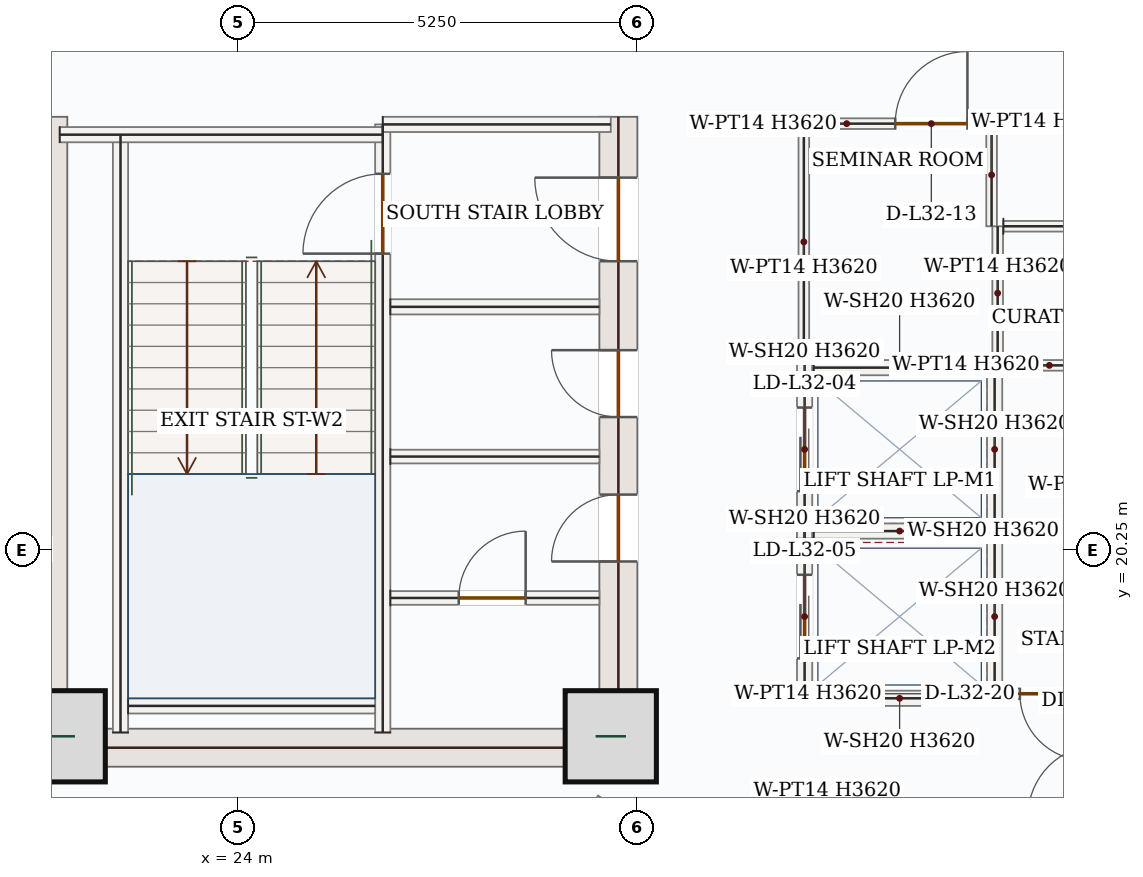
"""IFC4 building model, lengths in metres.
Left out: names, types, materials, properties, quantities, classifications, styles, units other than length and angle.
Written with IfcOpenShell. Run it as: python <this file> out.ifc"""

import sys

from ifc_helpers import new_model, si_unit, direction, frame, frame_2d, origin, origin_2d, place, context, subcontext, project, spatial, rectangle, extrude, source, transform, mapped, element, fill, save


model = new_model("IFC4")
c1 = context("Model", 3, precision=1e-05, world=origin(), true_north=direction((0.0, 1.0)))
c2 = subcontext(c1, "Body", "Model", "MODEL_VIEW")
j1 = project(units=[si_unit("LENGTHUNIT", "METRE"), si_unit("PLANEANGLEUNIT", "RADIAN")], contexts=[c1])
p1 = place(None, origin())
s1 = spatial("IfcSite", under=j1, at=p1, CompositionType="ELEMENT")
p2 = place(p1, origin())
s2 = spatial("IfcBuilding", under=s1, at=p2, CompositionType="ELEMENT")
p3 = place(p2, frame((0.0, 0.0, 143.4)))
s3 = spatial("IfcBuildingStorey", under=s2, at=p3, CompositionType="ELEMENT", Elevation=143.4)
m1 = source(origin(), c2, "Body", "SweptSolid", [
    extrude(rectangle(XDim=8.55, YDim=0.5, at=frame_2d((4.275, 0.0))), origin(), (0.0, 0.0, 1.0), 3.62),
])
p4 = place(p3, frame((21.5, 17.4, 0.0), z_axis=(0.0, 0.0, 1.0), x_axis=(0.0, 1.0, 0.0)))
e1 = element("IfcWall", 1, at=p4, inside=s3, PredefinedType="SHEAR", context=c2, shape_type="MappedRepresentation", body=[
    mapped(m1, transform((0.0, 0.0, 0.0), x_axis=(1.0, 0.0, 0.0), y_axis=(0.0, 1.0, 0.0), z_axis=(0.0, 0.0, 1.0), scale=1.0)),
])
p5 = place(p3, frame((29.0, 17.4, 0.0), z_axis=(0.0, 0.0, 1.0), x_axis=(0.0, 1.0, 0.0)))
e2 = element("IfcWall", 2, at=p5, inside=s3, PredefinedType="SHEAR", context=c2, shape_type="SweptSolid", body=[
    extrude(rectangle(XDim=8.55, YDim=0.5, at=frame_2d((4.275, 0.0))), origin(), (0.0, 0.0, 1.0), 3.62),
])
p6 = place(p5, frame((6.65, 0.0, 0.0)))
e3 = element("IfcOpeningElement", 3, at=p6, cuts=e2, PredefinedType="OPENING", context=c2, shape_type="SweptSolid", body=[
    extrude(rectangle(XDim=1.1, YDim=2.2, at=frame_2d((0.55, 1.1))), frame((0.0, 0.26, 0.0), z_axis=(0.0, -1.0, 0.0), x_axis=(1.0, 0.0, 0.0)), (0.0, 0.0, 1.0), 0.52),
])
p7 = place(p5, frame((2.7, 0.0, 0.0)))
e4 = element("IfcOpeningElement", 4, at=p7, cuts=e2, PredefinedType="OPENING", context=c2, shape_type="SweptSolid", body=[
    extrude(rectangle(XDim=0.88, YDim=2.1, at=frame_2d((0.44, 1.05))), frame((0.0, 0.26, 0.0), z_axis=(0.0, -1.0, 0.0), x_axis=(1.0, 0.0, 0.0)), (0.0, 0.0, 1.0), 0.52),
])
p8 = place(p5, frame((4.6, 0.0, 0.0)))
e5 = element("IfcOpeningElement", 5, at=p8, cuts=e2, PredefinedType="OPENING", context=c2, shape_type="SweptSolid", body=[
    extrude(rectangle(XDim=0.88, YDim=2.1, at=frame_2d((0.44, 1.05))), frame((0.0, 0.26, 0.0), z_axis=(0.0, -1.0, 0.0), x_axis=(1.0, 0.0, 0.0)), (0.0, 0.0, 1.0), 0.52),
])
m2 = source(origin(), c2, "Body", "SweptSolid", [
    extrude(rectangle(XDim=7.0, YDim=0.5, at=frame_2d((3.5, 0.0))), origin(), (0.0, 0.0, 1.0), 3.62),
])
p9 = place(p3, frame((21.75, 17.65, 0.0), z_axis=(0.0, 0.0, 1.0), x_axis=(1.0, 0.0, 0.0)))
e6 = element("IfcWall", 6, at=p9, inside=s3, PredefinedType="SHEAR", context=c2, shape_type="MappedRepresentation", body=[
    mapped(m2, transform((0.0, 0.0, 0.0), x_axis=(1.0, 0.0, 0.0), y_axis=(0.0, 1.0, 0.0), z_axis=(0.0, 0.0, 1.0), scale=1.0)),
])
m3 = source(origin(), c2, "Body", "SweptSolid", [
    extrude(rectangle(XDim=1.2, YDim=1.2, at=origin_2d()), origin(), (0.0, 0.0, 1.0), 3.9),
])
for number, where, z_axis, x_axis in (
    (7, (21.65, 17.8, 0.0), (0.0, 0.0, 1.0), (1.0, 0.0, 0.0)),
    (8, (28.9, 17.8, 0.0), (0.0, 0.0, 1.0), (1.0, 0.0, 0.0)),
):
    element("IfcColumn", number, at=place(p3, frame(where, z_axis=z_axis, x_axis=x_axis)), inside=s3, PredefinedType="COLUMN", context=c2, shape_type="MappedRepresentation", body=[
        mapped(m3, transform((0.0, 0.0, 0.0), x_axis=(1.0, 0.0, 0.0), y_axis=(0.0, 1.0, 0.0), z_axis=(0.0, 0.0, 1.0), scale=1.0)),
    ])
p10 = place(p3, frame((22.658, 14.74, 0.0), z_axis=(0.0, 0.0, 1.0), x_axis=(-0.707076011326, 0.707137549708, 0.0)))
e9 = element("IfcWall", 9, at=p10, inside=s3, PredefinedType="SOLIDWALL", context=c2, shape_type="SweptSolid", body=[
    extrude(rectangle(XDim=3.967, YDim=0.28, at=frame_2d((1.984, 0.0))), origin(), (0.0, 0.0, 1.0), 3.62),
])
p11 = place(p10, frame((1.084, 0.0, 0.85)))
e10 = element("IfcOpeningElement", 10, at=p11, cuts=e9, PredefinedType="OPENING", context=c2, shape_type="SweptSolid", body=[
    extrude(rectangle(XDim=1.8, YDim=1.75, at=frame_2d((0.9, 0.875))), frame((0.0, 0.15, 0.0), z_axis=(0.0, -1.0, 0.0), x_axis=(1.0, 0.0, 0.0)), (0.0, 0.0, 1.0), 0.3),
])
m4 = source(origin(), c2, "Body", "SweptSolid", [
    extrude(rectangle(XDim=7.87, YDim=0.2, at=frame_2d((3.935, 0.0))), origin(), (0.0, 0.0, 1.0), 3.62),
])
p12 = place(p3, frame((22.45, 17.85, 0.0), z_axis=(0.0, 0.0, 1.0), x_axis=(0.0, 1.0, 0.0)))
e11 = element("IfcWall", 11, at=p12, inside=s3, PredefinedType="SOLIDWALL", context=c2, shape_type="MappedRepresentation", body=[
    mapped(m4, transform((0.0, 0.0, 0.0), x_axis=(1.0, 0.0, 0.0), y_axis=(0.0, 1.0, 0.0), z_axis=(0.0, 0.0, 1.0), scale=1.0)),
])
p13 = place(p3, frame((25.9, 17.85, 0.0), z_axis=(0.0, 0.0, 1.0), x_axis=(0.0, 1.0, 0.0)))
e12 = element("IfcWall", 12, at=p13, inside=s3, PredefinedType="SOLIDWALL", context=c2, shape_type="SweptSolid", body=[
    extrude(rectangle(XDim=8.0, YDim=0.2, at=frame_2d((4.0, 0.0))), origin(), (0.0, 0.0, 1.0), 3.62),
])
p14 = place(p13, frame((6.3, 0.0, 0.0)))
e13 = element("IfcOpeningElement", 13, at=p14, cuts=e12, PredefinedType="OPENING", context=c2, shape_type="SweptSolid", body=[
    extrude(rectangle(XDim=1.05, YDim=2.15, at=frame_2d((0.525, 1.075))), frame((0.0, 0.11, 0.0), z_axis=(0.0, -1.0, 0.0), x_axis=(1.0, 0.0, 0.0)), (0.0, 0.0, 1.0), 0.22),
])
m5 = source(origin(), c2, "Body", "SweptSolid", [
    extrude(rectangle(XDim=4.25, YDim=0.2, at=frame_2d((2.125, 0.0))), origin(), (0.0, 0.0, 1.0), 3.62),
])
p15 = place(p3, frame((21.65, 25.715, 0.0), z_axis=(0.0, 0.0, 1.0), x_axis=(1.0, 0.0, 0.0)))
e14 = element("IfcWall", 14, at=p15, inside=s3, PredefinedType="SOLIDWALL", context=c2, shape_type="MappedRepresentation", body=[
    mapped(m5, transform((0.0, 0.0, 0.0), x_axis=(1.0, 0.0, 0.0), y_axis=(0.0, 1.0, 0.0), z_axis=(0.0, 0.0, 1.0), scale=1.0)),
])
m6 = source(origin(), c2, "Body", "SweptSolid", [
    extrude(rectangle(XDim=3.0, YDim=0.2, at=frame_2d((1.5, 0.0))), origin(), (0.0, 0.0, 1.0), 3.62),
])
p16 = place(p3, frame((25.9, 25.85, 0.0), z_axis=(0.0, 0.0, 1.0), x_axis=(1.0, 0.0, 0.0)))
e15 = element("IfcWall", 15, at=p16, inside=s3, PredefinedType="SOLIDWALL", context=c2, shape_type="MappedRepresentation", body=[
    mapped(m6, transform((0.0, 0.0, 0.0), x_axis=(1.0, 0.0, 0.0), y_axis=(0.0, 1.0, 0.0), z_axis=(0.0, 0.0, 1.0), scale=1.0)),
])
m7 = source(origin(), c2, "Body", "SweptSolid", [
    extrude(rectangle(XDim=3.25, YDim=0.2, at=frame_2d((1.625, 0.0))), origin(), (0.0, 0.0, 1.0), 3.62),
])
p17 = place(p3, frame((22.55, 18.2, 0.0), z_axis=(0.0, 0.0, 1.0), x_axis=(1.0, 0.0, 0.0)))
e16 = element("IfcWall", 16, at=p17, inside=s3, PredefinedType="SOLIDWALL", context=c2, shape_type="MappedRepresentation", body=[
    mapped(m7, transform((0.0, 0.0, 0.0), x_axis=(1.0, 0.0, 0.0), y_axis=(0.0, 1.0, 0.0), z_axis=(0.0, 0.0, 1.0), scale=1.0)),
])
m8 = source(origin(), c2, "Body", "SweptSolid", [
    extrude(rectangle(XDim=2.75, YDim=0.2, at=frame_2d((1.375, 0.0))), origin(), (0.0, 0.0, 1.0), 3.62),
])
p18 = place(p3, frame((26.0, 23.45, 0.0), z_axis=(0.0, 0.0, 1.0), x_axis=(1.0, 0.0, 0.0)))
e17 = element("IfcWall", 17, at=p18, inside=s3, PredefinedType="SOLIDWALL", context=c2, shape_type="MappedRepresentation", body=[
    mapped(m8, transform((0.0, 0.0, 0.0), x_axis=(1.0, 0.0, 0.0), y_axis=(0.0, 1.0, 0.0), z_axis=(0.0, 0.0, 1.0), scale=1.0)),
])
p19 = place(p3, frame((26.0, 19.62, 0.0), z_axis=(0.0, 0.0, 1.0), x_axis=(1.0, 0.0, 0.0)))
e18 = element("IfcWall", 18, at=p19, inside=s3, PredefinedType="PARTITIONING", context=c2, shape_type="SweptSolid", body=[
    extrude(rectangle(XDim=2.75, YDim=0.18, at=frame_2d((1.375, 0.0))), origin(), (0.0, 0.0, 1.0), 3.62),
])
p20 = place(p19, frame((0.9, 0.0, 0.0)))
e19 = element("IfcOpeningElement", 19, at=p20, cuts=e18, PredefinedType="OPENING", context=c2, shape_type="SweptSolid", body=[
    extrude(rectangle(XDim=0.88, YDim=2.1, at=frame_2d((0.44, 1.05))), frame((0.0, 0.1, 0.0), z_axis=(0.0, -1.0, 0.0), x_axis=(1.0, 0.0, 0.0)), (0.0, 0.0, 1.0), 0.2),
])
m9 = source(origin(), c2, "Body", "SweptSolid", [
    extrude(rectangle(XDim=2.75, YDim=0.18, at=frame_2d((1.375, 0.0))), origin(), (0.0, 0.0, 1.0), 3.62),
])
p21 = place(p3, frame((26.0, 21.48, 0.0), z_axis=(0.0, 0.0, 1.0), x_axis=(1.0, 0.0, 0.0)))
e20 = element("IfcWall", 20, at=p21, inside=s3, PredefinedType="PARTITIONING", context=c2, shape_type="MappedRepresentation", body=[
    mapped(m9, transform((0.0, 0.0, 0.0), x_axis=(1.0, 0.0, 0.0), y_axis=(0.0, 1.0, 0.0), z_axis=(0.0, 0.0, 1.0), scale=1.0)),
])
p22 = place(p3, frame((31.45, 20.4, 0.0), z_axis=(0.0, 0.0, 1.0), x_axis=(0.0, 1.0, 0.0)))
e21 = element("IfcWall", 21, at=p22, inside=s3, PredefinedType="SOLIDWALL", context=c2, shape_type="SweptSolid", body=[
    extrude(rectangle(XDim=2.35, YDim=0.2, at=frame_2d((1.175, 0.0))), origin(), (0.0, 0.0, 1.0), 3.62),
])
p23 = place(p22, frame((0.625, 0.0, 0.0)))
e22 = element("IfcOpeningElement", 22, at=p23, cuts=e21, PredefinedType="OPENING", context=c2, shape_type="SweptSolid", body=[
    extrude(rectangle(XDim=1.1, YDim=2.15, at=frame_2d((0.55, 1.075))), frame((0.0, 0.11, 0.0), z_axis=(0.0, -1.0, 0.0), x_axis=(1.0, 0.0, 0.0)), (0.0, 0.0, 1.0), 0.22),
])
m10 = source(origin(), c2, "Body", "SweptSolid", [
    extrude(rectangle(XDim=2.35, YDim=0.2, at=frame_2d((1.175, 0.0))), origin(), (0.0, 0.0, 1.0), 3.62),
])
p24 = place(p3, frame((33.95, 20.4, 0.0), z_axis=(0.0, 0.0, 1.0), x_axis=(0.0, 1.0, 0.0)))
e23 = element("IfcWall", 23, at=p24, inside=s3, PredefinedType="SOLIDWALL", context=c2, shape_type="MappedRepresentation", body=[
    mapped(m10, transform((0.0, 0.0, 0.0), x_axis=(1.0, 0.0, 0.0), y_axis=(0.0, 1.0, 0.0), z_axis=(0.0, 0.0, 1.0), scale=1.0)),
])
m11 = source(origin(), c2, "Body", "SweptSolid", [
    extrude(rectangle(XDim=2.26, YDim=0.2, at=frame_2d((1.13, 0.0))), origin(), (0.0, 0.0, 1.0), 3.62),
])
for number, where, z_axis, x_axis in (
    (24, (31.57, 20.5, 0.0), (0.0, 0.0, 1.0), (1.0, 0.0, 0.0)),
    (25, (31.57, 22.65, 0.0), (0.0, 0.0, 1.0), (1.0, 0.0, 0.0)),
):
    element("IfcWall", number, at=place(p3, frame(where, z_axis=z_axis, x_axis=x_axis)), inside=s3, PredefinedType="SOLIDWALL", context=c2, shape_type="MappedRepresentation", body=[
        mapped(m11, transform((0.0, 0.0, 0.0), x_axis=(1.0, 0.0, 0.0), y_axis=(0.0, 1.0, 0.0), z_axis=(0.0, 0.0, 1.0), scale=1.0)),
    ])
p25 = place(p3, frame((31.45, 18.2, 0.0), z_axis=(0.0, 0.0, 1.0), x_axis=(0.0, 1.0, 0.0)))
e26 = element("IfcWall", 26, at=p25, inside=s3, PredefinedType="SOLIDWALL", context=c2, shape_type="SweptSolid", body=[
    extrude(rectangle(XDim=2.35, YDim=0.2, at=frame_2d((1.175, 0.0))), origin(), (0.0, 0.0, 1.0), 3.62),
])
p26 = place(p25, frame((0.625, 0.0, 0.0)))
e27 = element("IfcOpeningElement", 27, at=p26, cuts=e26, PredefinedType="OPENING", context=c2, shape_type="SweptSolid", body=[
    extrude(rectangle(XDim=1.1, YDim=2.15, at=frame_2d((0.55, 1.075))), frame((0.0, 0.11, 0.0), z_axis=(0.0, -1.0, 0.0), x_axis=(1.0, 0.0, 0.0)), (0.0, 0.0, 1.0), 0.22),
])
p27 = place(p3, frame((33.95, 18.2, 0.0), z_axis=(0.0, 0.0, 1.0), x_axis=(0.0, 1.0, 0.0)))
e28 = element("IfcWall", 28, at=p27, inside=s3, PredefinedType="SOLIDWALL", context=c2, shape_type="MappedRepresentation", body=[
    mapped(m10, transform((0.0, 0.0, 0.0), x_axis=(1.0, 0.0, 0.0), y_axis=(0.0, 1.0, 0.0), z_axis=(0.0, 0.0, 1.0), scale=1.0)),
])
p28 = place(p3, frame((31.57, 18.3, 0.0), z_axis=(0.0, 0.0, 1.0), x_axis=(1.0, 0.0, 0.0)))
e29 = element("IfcWall", 29, at=p28, inside=s3, PredefinedType="SOLIDWALL", context=c2, shape_type="MappedRepresentation", body=[
    mapped(m11, transform((0.0, 0.0, 0.0), x_axis=(1.0, 0.0, 0.0), y_axis=(0.0, 1.0, 0.0), z_axis=(0.0, 0.0, 1.0), scale=1.0)),
])
m12 = source(origin(), c2, "Body", "SweptSolid", [
    extrude(rectangle(XDim=1.23, YDim=0.14, at=frame_2d((0.615, 0.0))), origin(), (0.0, 0.0, 1.0), 3.62),
])
p29 = place(p3, frame((34.055, 22.68, 0.0), z_axis=(0.0, 0.0, 1.0), x_axis=(1.0, 0.0, 0.0)))
e30 = element("IfcWall", 30, at=p29, inside=s3, PredefinedType="PARTITIONING", context=c2, shape_type="MappedRepresentation", body=[
    mapped(m12, transform((0.0, 0.0, 0.0), x_axis=(1.0, 0.0, 0.0), y_axis=(0.0, 1.0, 0.0), z_axis=(0.0, 0.0, 1.0), scale=1.0)),
])
p30 = place(p3, frame((35.285, 18.36, 0.0), z_axis=(0.0, 0.0, 1.0), x_axis=(-1.0, 0.0, 0.0)))
e31 = element("IfcWall", 31, at=p30, inside=s3, PredefinedType="PARTITIONING", context=c2, shape_type="SweptSolid", body=[
    extrude(rectangle(XDim=1.23, YDim=0.14, at=frame_2d((0.615, 0.0))), origin(), (0.0, 0.0, 1.0), 3.62),
])
p31 = place(p30, frame((0.123, 0.0, 0.0)))
e32 = element("IfcOpeningElement", 32, at=p31, cuts=e31, PredefinedType="OPENING", context=c2, shape_type="SweptSolid", body=[
    extrude(rectangle(XDim=0.88, YDim=2.1, at=frame_2d((0.44, 1.05))), frame((0.0, 0.08, 0.0), z_axis=(0.0, -1.0, 0.0), x_axis=(1.0, 0.0, 0.0)), (0.0, 0.0, 1.0), 0.16),
])
m13 = source(origin(), c2, "Body", "SweptSolid", [
    extrude(rectangle(XDim=1.76, YDim=0.14, at=frame_2d((0.88, 0.0))), origin(), (0.0, 0.0, 1.0), 3.62),
])
p32 = place(p3, frame((33.99, 22.75, 0.0), z_axis=(0.0, 0.0, 1.0), x_axis=(0.0, 1.0, 0.0)))
e33 = element("IfcWall", 33, at=p32, inside=s3, PredefinedType="PARTITIONING", context=c2, shape_type="MappedRepresentation", body=[
    mapped(m13, transform((0.0, 0.0, 0.0), x_axis=(1.0, 0.0, 0.0), y_axis=(0.0, 1.0, 0.0), z_axis=(0.0, 0.0, 1.0), scale=1.0)),
])
m14 = source(origin(), c2, "Body", "SweptSolid", [
    extrude(rectangle(XDim=3.945, YDim=0.14, at=frame_2d((1.973, 0.0))), origin(), (0.0, 0.0, 1.0), 3.62),
])
p33 = place(p3, frame((34.065, 24.51, 0.0), z_axis=(0.0, 0.0, 1.0), x_axis=(1.0, 0.0, 0.0)))
e34 = element("IfcWall", 34, at=p33, inside=s3, PredefinedType="PARTITIONING", context=c2, shape_type="MappedRepresentation", body=[
    mapped(m14, transform((0.0, 0.0, 0.0), x_axis=(1.0, 0.0, 0.0), y_axis=(0.0, 1.0, 0.0), z_axis=(0.0, 0.0, 1.0), scale=1.0)),
])
m15 = source(origin(), c2, "Body", "SweptSolid", [
    extrude(rectangle(XDim=3.11, YDim=0.14, at=frame_2d((1.555, 0.0))), origin(), (0.0, 0.0, 1.0), 3.62),
])
p34 = place(p3, frame((31.44, 22.75, 0.0), z_axis=(0.0, 0.0, 1.0), x_axis=(0.0, 1.0, 0.0)))
e35 = element("IfcWall", 35, at=p34, inside=s3, PredefinedType="PARTITIONING", context=c2, shape_type="MappedRepresentation", body=[
    mapped(m15, transform((0.0, 0.0, 0.0), x_axis=(1.0, 0.0, 0.0), y_axis=(0.0, 1.0, 0.0), z_axis=(0.0, 0.0, 1.0), scale=1.0)),
])
p35 = place(p3, frame((31.515, 25.86, 0.0), z_axis=(0.0, 0.0, 1.0), x_axis=(1.0, 0.0, 0.0)))
e36 = element("IfcWall", 36, at=p35, inside=s3, PredefinedType="PARTITIONING", context=c2, shape_type="SweptSolid", body=[
    extrude(rectangle(XDim=2.395, YDim=0.14, at=frame_2d((1.198, 0.0))), origin(), (0.0, 0.0, 1.0), 3.62),
])
p36 = place(p35, frame((1.127, 0.0, 0.0)))
e37 = element("IfcOpeningElement", 37, at=p36, cuts=e36, PredefinedType="OPENING", context=c2, shape_type="SweptSolid", body=[
    extrude(rectangle(XDim=0.95, YDim=2.15, at=frame_2d((0.475, 1.075))), frame((0.0, 0.08, 0.0), z_axis=(0.0, -1.0, 0.0), x_axis=(1.0, 0.0, 0.0)), (0.0, 0.0, 1.0), 0.16),
])
m16 = source(origin(), c2, "Body", "SweptSolid", [
    extrude(rectangle(XDim=1.35, YDim=0.14, at=frame_2d((0.675, 0.0))), origin(), (0.0, 0.0, 1.0), 3.62),
])
p37 = place(p3, frame((33.91, 25.86, 0.0), z_axis=(0.0, 0.0, 1.0), x_axis=(0.0, -1.0, 0.0)))
e38 = element("IfcWall", 38, at=p37, inside=s3, PredefinedType="PARTITIONING", context=c2, shape_type="MappedRepresentation", body=[
    mapped(m16, transform((0.0, 0.0, 0.0), x_axis=(1.0, 0.0, 0.0), y_axis=(0.0, 1.0, 0.0), z_axis=(0.0, 0.0, 1.0), scale=1.0)),
])
m17 = source(origin(), c2, "Body", "SweptSolid", [
    extrude(rectangle(XDim=2.565, YDim=0.14, at=frame_2d((1.282, 0.0))), origin(), (0.0, 0.0, 1.0), 3.62),
])
p38 = place(p3, frame((27.311, 14.885, 0.0), z_axis=(0.0, 0.0, 1.0), x_axis=(0.576926084836, 0.816796359343, 0.0)))
e39 = element("IfcWall", 39, at=p38, inside=s3, PredefinedType="PARTITIONING", context=c2, shape_type="MappedRepresentation", body=[
    mapped(m17, transform((0.0, 0.0, 0.0), x_axis=(1.0, 0.0, 0.0), y_axis=(0.0, 1.0, 0.0), z_axis=(0.0, 0.0, 1.0), scale=1.0)),
])
m18 = source(origin(), c2, "Body", "SweptSolid", [
    extrude(rectangle(XDim=1.05, YDim=2.15, at=frame_2d((0.525, 1.075))), frame((0.0, 0.025, 0.0), z_axis=(0.0, -1.0, 0.0), x_axis=(1.0, 0.0, 0.0)), (0.0, 0.0, 1.0), 0.05),
])
p39 = place(p14, origin())
e40 = element("IfcDoor", 40, at=p39, inside=s3, OperationType="SINGLE_SWING_LEFT", PredefinedType="DOOR", context=c2, shape_type="MappedRepresentation", body=[
    mapped(m18, transform((0.0, 0.0, 0.0), x_axis=(1.0, 0.0, 0.0), y_axis=(0.0, 1.0, 0.0), z_axis=(0.0, 0.0, 1.0), scale=1.0)),
])
fill(e13, e40)
m19 = source(origin(), c2, "Body", "SweptSolid", [
    extrude(rectangle(XDim=1.1, YDim=2.2, at=frame_2d((0.55, 1.1))), frame((0.0, 0.025, 0.0), z_axis=(0.0, -1.0, 0.0), x_axis=(1.0, 0.0, 0.0)), (0.0, 0.0, 1.0), 0.05),
])
p40 = place(p6, origin())
e41 = element("IfcDoor", 41, at=p40, inside=s3, OperationType="SINGLE_SWING_RIGHT", PredefinedType="DOOR", context=c2, shape_type="MappedRepresentation", body=[
    mapped(m19, transform((0.0, 0.0, 0.0), x_axis=(1.0, 0.0, 0.0), y_axis=(0.0, 1.0, 0.0), z_axis=(0.0, 0.0, 1.0), scale=1.0)),
])
fill(e3, e41)
m20 = source(origin(), c2, "Body", "SweptSolid", [
    extrude(rectangle(XDim=0.88, YDim=2.1, at=frame_2d((0.44, 1.05))), frame((0.0, 0.025, 0.0), z_axis=(0.0, -1.0, 0.0), x_axis=(1.0, 0.0, 0.0)), (0.0, 0.0, 1.0), 0.05),
])
p41 = place(p20, origin())
e42 = element("IfcDoor", 42, at=p41, inside=s3, OperationType="SINGLE_SWING_RIGHT", PredefinedType="DOOR", context=c2, shape_type="MappedRepresentation", body=[
    mapped(m20, transform((0.0, 0.0, 0.0), x_axis=(1.0, 0.0, 0.0), y_axis=(0.0, 1.0, 0.0), z_axis=(0.0, 0.0, 1.0), scale=1.0)),
])
fill(e19, e42)
p42 = place(p7, origin())
e43 = element("IfcDoor", 43, at=p42, inside=s3, OperationType="SINGLE_SWING_LEFT", PredefinedType="DOOR", context=c2, shape_type="MappedRepresentation", body=[
    mapped(m20, transform((0.0, 0.0, 0.0), x_axis=(1.0, 0.0, 0.0), y_axis=(0.0, 1.0, 0.0), z_axis=(0.0, 0.0, 1.0), scale=1.0)),
])
fill(e4, e43)
p43 = place(p8, origin())
e44 = element("IfcDoor", 44, at=p43, inside=s3, OperationType="SINGLE_SWING_RIGHT", PredefinedType="DOOR", context=c2, shape_type="MappedRepresentation", body=[
    mapped(m20, transform((0.0, 0.0, 0.0), x_axis=(1.0, 0.0, 0.0), y_axis=(0.0, 1.0, 0.0), z_axis=(0.0, 0.0, 1.0), scale=1.0)),
])
fill(e5, e44)
m21 = source(origin(), c2, "Body", "SweptSolid", [
    extrude(rectangle(XDim=1.1, YDim=2.15, at=frame_2d((0.55, 1.075))), frame((0.0, 0.025, 0.0), z_axis=(0.0, -1.0, 0.0), x_axis=(1.0, 0.0, 0.0)), (0.0, 0.0, 1.0), 0.05),
])
p44 = place(p23, origin())
e45 = element("IfcDoor", 45, at=p44, inside=s3, OperationType="DOUBLE_DOOR_SLIDING", PredefinedType="DOOR", context=c2, shape_type="MappedRepresentation", body=[
    mapped(m21, transform((0.0, 0.0, 0.0), x_axis=(1.0, 0.0, 0.0), y_axis=(0.0, 1.0, 0.0), z_axis=(0.0, 0.0, 1.0), scale=1.0)),
])
fill(e22, e45)
p45 = place(p26, origin())
e46 = element("IfcDoor", 46, at=p45, inside=s3, OperationType="DOUBLE_DOOR_SLIDING", PredefinedType="DOOR", context=c2, shape_type="MappedRepresentation", body=[
    mapped(m21, transform((0.0, 0.0, 0.0), x_axis=(1.0, 0.0, 0.0), y_axis=(0.0, 1.0, 0.0), z_axis=(0.0, 0.0, 1.0), scale=1.0)),
])
fill(e27, e46)
m22 = source(origin(), c2, "Body", "SweptSolid", [
    extrude(rectangle(XDim=0.95, YDim=2.15, at=frame_2d((0.475, 1.075))), frame((0.0, 0.025, 0.0), z_axis=(0.0, -1.0, 0.0), x_axis=(1.0, 0.0, 0.0)), (0.0, 0.0, 1.0), 0.05),
])
p46 = place(p36, origin())
e47 = element("IfcDoor", 47, at=p46, inside=s3, OperationType="SINGLE_SWING_RIGHT", PredefinedType="DOOR", context=c2, shape_type="MappedRepresentation", body=[
    mapped(m22, transform((0.0, 0.0, 0.0), x_axis=(1.0, 0.0, 0.0), y_axis=(0.0, 1.0, 0.0), z_axis=(0.0, 0.0, 1.0), scale=1.0)),
])
fill(e37, e47)
p47 = place(p31, origin())
e48 = element("IfcDoor", 48, at=p47, inside=s3, OperationType="SINGLE_SWING_LEFT", PredefinedType="DOOR", context=c2, shape_type="MappedRepresentation", body=[
    mapped(m20, transform((0.0, 0.0, 0.0), x_axis=(1.0, 0.0, 0.0), y_axis=(0.0, 1.0, 0.0), z_axis=(0.0, 0.0, 1.0), scale=1.0)),
])
fill(e32, e48)
save(model, sys.argv[1])
